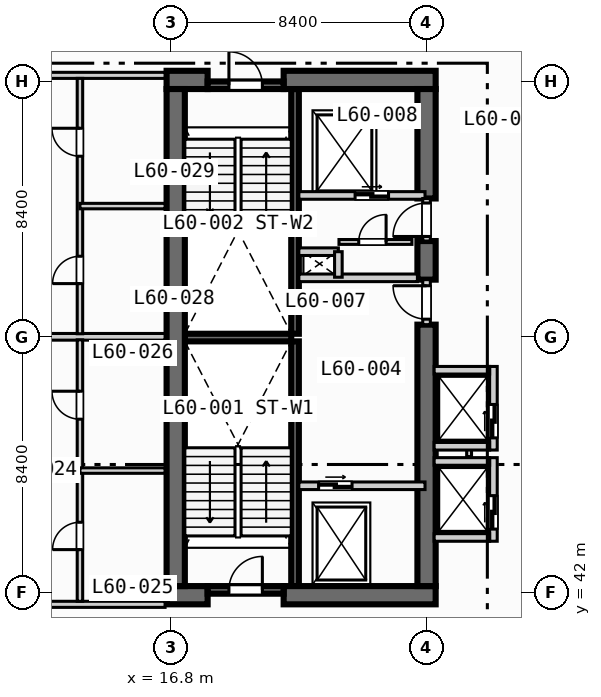
"""IFC4 building model, lengths in metres.
Left out: names, types, materials, properties, quantities, classifications, styles, units other than length and angle.
Written with IfcOpenShell. Run it as: python <this file> out.ifc"""

import sys

from ifc_helpers import new_model, si_unit, direction, frame, frame_2d, origin, place, context, subcontext, project, spatial, rectangle, extrude, element, fill, save


model = new_model("IFC4")
c1 = context("Model", 3, precision=1e-05, world=origin(), true_north=direction((0.0, 1.0)))
c2 = subcontext(c1, "Body", "Model", "MODEL_VIEW")
j1 = project(units=[si_unit("LENGTHUNIT", "METRE"), si_unit("PLANEANGLEUNIT", "RADIAN")], contexts=[c1])
p1 = place(None, origin())
s1 = spatial("IfcSite", under=j1, at=p1, CompositionType="ELEMENT")
p2 = place(p1, origin())
s2 = spatial("IfcBuilding", under=s1, at=p2, CompositionType="ELEMENT")
p3 = place(p2, frame((0.0, 0.0, 245.3)))
s3 = spatial("IfcBuildingStorey", under=s2, at=p3, CompositionType="ELEMENT", Elevation=245.3)
for number, where, z_axis, x_axis in (
    (1, (20.875, 42.2, 0.0), (0.0, 0.0, 1.0), (0.0, 1.0, 0.0)),
    (2, (20.875, 50.5, 0.0), (0.0, 0.0, 1.0), (0.0, 1.0, 0.0)),
):
    element("IfcWall", number, at=place(p3, frame(where, z_axis=z_axis, x_axis=x_axis)), inside=s3, PredefinedType="SOLIDWALL", context=c2, shape_type="SweptSolid", body=[
        extrude(rectangle(XDim=8.05, YDim=0.25, at=frame_2d((4.025, 0.0))), origin(), (0.0, 0.0, 1.0), 3.47),
    ])
p4 = place(p3, frame((17.25, 50.375, 0.0), z_axis=(0.0, 0.0, 1.0), x_axis=(1.0, 0.0, 0.0)))
e3 = element("IfcWall", 3, at=p4, inside=s3, PredefinedType="SOLIDWALL", context=c2, shape_type="SweptSolid", body=[
    extrude(rectangle(XDim=3.5, YDim=0.25, at=frame_2d((1.75, 0.0))), origin(), (0.0, 0.0, 1.0), 3.47),
])
p5 = place(p3, frame((16.65, 41.9, 0.0), z_axis=(0.0, 0.0, 1.0), x_axis=(1.0, 0.0, 0.0)))
e4 = element("IfcWall", 4, at=p5, inside=s3, PredefinedType="SHEAR", context=c2, shape_type="SweptSolid", body=[
    extrude(rectangle(XDim=1.35, YDim=0.6, at=frame_2d((0.675, 0.0))), origin(), (0.0, 0.0, 1.0), 3.47),
])
p6 = place(p3, frame((20.5, 41.9, 0.0), z_axis=(0.0, 0.0, 1.0), x_axis=(1.0, 0.0, 0.0)))
e5 = element("IfcWall", 5, at=p6, inside=s3, PredefinedType="SHEAR", context=c2, shape_type="SweptSolid", body=[
    extrude(rectangle(XDim=5.0, YDim=0.6, at=frame_2d((2.5, 0.0))), origin(), (0.0, 0.0, 1.0), 3.47),
])
p7 = place(p3, frame((16.65, 58.85, 0.0), z_axis=(0.0, 0.0, 1.0), x_axis=(1.0, 0.0, 0.0)))
e6 = element("IfcWall", 6, at=p7, inside=s3, PredefinedType="SHEAR", context=c2, shape_type="SweptSolid", body=[
    extrude(rectangle(XDim=1.35, YDim=0.6, at=frame_2d((0.675, 0.0))), origin(), (0.0, 0.0, 1.0), 3.47),
])
p8 = place(p3, frame((20.5, 58.85, 0.0), z_axis=(0.0, 0.0, 1.0), x_axis=(1.0, 0.0, 0.0)))
e7 = element("IfcWall", 7, at=p8, inside=s3, PredefinedType="SHEAR", context=c2, shape_type="SweptSolid", body=[
    extrude(rectangle(XDim=5.0, YDim=0.6, at=frame_2d((2.5, 0.0))), origin(), (0.0, 0.0, 1.0), 3.47),
])
p9 = place(p3, frame((16.95, 42.2, 0.0), z_axis=(0.0, 0.0, 1.0), x_axis=(0.0, 1.0, 0.0)))
e8 = element("IfcWall", 8, at=p9, inside=s3, PredefinedType="SHEAR", context=c2, shape_type="SweptSolid", body=[
    extrude(rectangle(XDim=16.35, YDim=0.6, at=frame_2d((8.175, 0.0))), origin(), (0.0, 0.0, 1.0), 3.47),
])
p10 = place(p3, frame((25.2, 42.2, 0.0), z_axis=(0.0, 0.0, 1.0), x_axis=(0.0, 1.0, 0.0)))
e9 = element("IfcWall", 9, at=p10, inside=s3, PredefinedType="SHEAR", context=c2, shape_type="SweptSolid", body=[
    extrude(rectangle(XDim=8.6, YDim=0.6, at=frame_2d((4.3, 0.0))), origin(), (0.0, 0.0, 1.0), 3.47),
])
p11 = place(p3, frame((25.2, 52.28, 0.0), z_axis=(0.0, 0.0, 1.0), x_axis=(0.0, 1.0, 0.0)))
e10 = element("IfcWall", 10, at=p11, inside=s3, PredefinedType="SHEAR", context=c2, shape_type="SweptSolid", body=[
    extrude(rectangle(XDim=1.27, YDim=0.6, at=frame_2d((0.635, 0.0))), origin(), (0.0, 0.0, 1.0), 3.47),
])
p12 = place(p3, frame((25.2, 54.95, 0.0), z_axis=(0.0, 0.0, 1.0), x_axis=(0.0, 1.0, 0.0)))
e11 = element("IfcWall", 11, at=p12, inside=s3, PredefinedType="SHEAR", context=c2, shape_type="SweptSolid", body=[
    extrude(rectangle(XDim=3.6, YDim=0.6, at=frame_2d((1.8, 0.0))), origin(), (0.0, 0.0, 1.0), 3.47),
])
p13 = place(p3, frame((18.0, 42.075, 0.0), z_axis=(0.0, 0.0, 1.0), x_axis=(1.0, 0.0, 0.0)))
e12 = element("IfcWall", 12, at=p13, inside=s3, PredefinedType="SOLIDWALL", context=c2, shape_type="SweptSolid", body=[
    extrude(rectangle(XDim=2.5, YDim=0.25, at=frame_2d((1.25, 0.0))), origin(), (0.0, 0.0, 1.0), 3.47),
])
p14 = place(p13, frame((0.7, 0.0, 0.0)))
e13 = element("IfcOpeningElement", 13, at=p14, cuts=e12, PredefinedType="OPENING", context=c2, shape_type="SweptSolid", body=[
    extrude(rectangle(XDim=1.1, YDim=2.15, at=frame_2d((0.55, 1.075))), frame((0.0, 0.135, 0.0), z_axis=(0.0, -1.0, 0.0), x_axis=(1.0, 0.0, 0.0)), (0.0, 0.0, 1.0), 0.27),
])
p15 = place(p3, frame((18.0, 58.675, 0.0), z_axis=(0.0, 0.0, 1.0), x_axis=(1.0, 0.0, 0.0)))
e14 = element("IfcWall", 14, at=p15, inside=s3, PredefinedType="SOLIDWALL", context=c2, shape_type="SweptSolid", body=[
    extrude(rectangle(XDim=2.5, YDim=0.25, at=frame_2d((1.25, 0.0))), origin(), (0.0, 0.0, 1.0), 3.47),
])
p16 = place(p15, frame((0.7, 0.0, 0.0)))
e15 = element("IfcOpeningElement", 15, at=p16, cuts=e14, PredefinedType="OPENING", context=c2, shape_type="SweptSolid", body=[
    extrude(rectangle(XDim=1.1, YDim=2.15, at=frame_2d((0.55, 1.075))), frame((0.0, 0.135, 0.0), z_axis=(0.0, -1.0, 0.0), x_axis=(1.0, 0.0, 0.0)), (0.0, 0.0, 1.0), 0.27),
])
p17 = place(p3, frame((21.0, 45.5, 0.0), z_axis=(0.0, 0.0, 1.0), x_axis=(1.0, 0.0, 0.0)))
e16 = element("IfcWall", 16, at=p17, inside=s3, PredefinedType="SOLIDWALL", context=c2, shape_type="SweptSolid", body=[
    extrude(rectangle(XDim=4.15, YDim=0.25, at=frame_2d((2.075, 0.0))), origin(), (0.0, 0.0, 1.0), 3.47),
])
p18 = place(p17, frame((0.65, 0.0, 0.0)))
e17 = element("IfcOpeningElement", 17, at=p18, cuts=e16, PredefinedType="OPENING", context=c2, shape_type="SweptSolid", body=[
    extrude(rectangle(XDim=1.1, YDim=2.15, at=frame_2d((0.55, 1.075))), frame((0.0, 0.135, 0.0), z_axis=(0.0, -1.0, 0.0), x_axis=(1.0, 0.0, 0.0)), (0.0, 0.0, 1.0), 0.27),
])
p19 = place(p3, frame((25.2, 50.8, 0.0), z_axis=(0.0, 0.0, 1.0), x_axis=(0.0, 1.0, 0.0)))
e18 = element("IfcWall", 18, at=p19, inside=s3, PredefinedType="SOLIDWALL", context=c2, shape_type="SweptSolid", body=[
    extrude(rectangle(XDim=1.48, YDim=0.25, at=frame_2d((0.74, 0.0))), origin(), (0.0, 0.0, 1.0), 3.47),
])
p20 = place(p19, frame((0.18, 0.0, 0.0)))
e19 = element("IfcOpeningElement", 19, at=p20, cuts=e18, PredefinedType="OPENING", context=c2, shape_type="SweptSolid", body=[
    extrude(rectangle(XDim=1.1, YDim=2.15, at=frame_2d((0.55, 1.075))), frame((0.0, 0.135, 0.0), z_axis=(0.0, -1.0, 0.0), x_axis=(1.0, 0.0, 0.0)), (0.0, 0.0, 1.0), 0.27),
])
p21 = place(p3, frame((21.0, 52.34, 0.0), z_axis=(0.0, 0.0, 1.0), x_axis=(1.0, 0.0, 0.0)))
e20 = element("IfcWall", 20, at=p21, inside=s3, PredefinedType="SOLIDWALL", context=c2, shape_type="SweptSolid", body=[
    extrude(rectangle(XDim=3.9, YDim=0.25, at=frame_2d((1.95, 0.0))), origin(), (0.0, 0.0, 1.0), 3.47),
])
p22 = place(p3, frame((21.0, 55.05, 0.0), z_axis=(0.0, 0.0, 1.0), x_axis=(1.0, 0.0, 0.0)))
e21 = element("IfcWall", 21, at=p22, inside=s3, PredefinedType="SOLIDWALL", context=c2, shape_type="SweptSolid", body=[
    extrude(rectangle(XDim=4.15, YDim=0.25, at=frame_2d((2.075, 0.0))), origin(), (0.0, 0.0, 1.0), 3.47),
])
p23 = place(p22, frame((1.85, 0.0, 0.0)))
e22 = element("IfcOpeningElement", 22, at=p23, cuts=e21, PredefinedType="OPENING", context=c2, shape_type="SweptSolid", body=[
    extrude(rectangle(XDim=1.1, YDim=2.15, at=frame_2d((0.55, 1.075))), frame((0.0, 0.135, 0.0), z_axis=(0.0, -1.0, 0.0), x_axis=(1.0, 0.0, 0.0)), (0.0, 0.0, 1.0), 0.27),
])
p24 = place(p3, frame((25.2, 53.55, 0.0), z_axis=(0.0, 0.0, 1.0), x_axis=(0.0, 1.0, 0.0)))
e23 = element("IfcWall", 23, at=p24, inside=s3, PredefinedType="SOLIDWALL", context=c2, shape_type="SweptSolid", body=[
    extrude(rectangle(XDim=1.4, YDim=0.25, at=frame_2d((0.7, 0.0))), origin(), (0.0, 0.0, 1.0), 3.47),
])
p25 = place(p24, frame((0.15, 0.0, 0.0)))
e24 = element("IfcOpeningElement", 24, at=p25, cuts=e23, PredefinedType="OPENING", context=c2, shape_type="SweptSolid", body=[
    extrude(rectangle(XDim=1.1, YDim=2.15, at=frame_2d((0.55, 1.075))), frame((0.0, 0.135, 0.0), z_axis=(0.0, -1.0, 0.0), x_axis=(1.0, 0.0, 0.0)), (0.0, 0.0, 1.0), 0.27),
])
p26 = place(p3, frame((21.0, 53.2, 0.0), z_axis=(0.0, 0.0, 1.0), x_axis=(1.0, 0.0, 0.0)))
e25 = element("IfcWall", 25, at=p26, inside=s3, PredefinedType="SOLIDWALL", context=c2, shape_type="SweptSolid", body=[
    extrude(rectangle(XDim=1.3, YDim=0.25, at=frame_2d((0.65, 0.0))), origin(), (0.0, 0.0, 1.0), 3.47),
])
p27 = place(p3, frame((22.3, 52.36, 0.0), z_axis=(0.0, 0.0, 1.0), x_axis=(0.0, 1.0, 0.0)))
e26 = element("IfcWall", 26, at=p27, inside=s3, PredefinedType="SOLIDWALL", context=c2, shape_type="SweptSolid", body=[
    extrude(rectangle(XDim=0.84, YDim=0.25, at=frame_2d((0.42, 0.0))), origin(), (0.0, 0.0, 1.0), 3.47),
])
p28 = place(p3, frame((22.32, 53.52, 0.0), z_axis=(0.0, 0.0, 1.0), x_axis=(1.0, 0.0, 0.0)))
e27 = element("IfcWall", 27, at=p28, inside=s3, PredefinedType="PARTITIONING", context=c2, shape_type="SweptSolid", body=[
    extrude(rectangle(XDim=2.4, YDim=0.16, at=frame_2d((1.2, 0.0))), origin(), (0.0, 0.0, 1.0), 3.47),
])
p29 = place(p28, frame((0.65, 0.0, 0.0)))
e28 = element("IfcOpeningElement", 28, at=p29, cuts=e27, PredefinedType="OPENING", context=c2, shape_type="SweptSolid", body=[
    extrude(rectangle(XDim=0.9, YDim=2.1, at=frame_2d((0.45, 1.05))), frame((0.0, 0.09, 0.0), z_axis=(0.0, -1.0, 0.0), x_axis=(1.0, 0.0, 0.0)), (0.0, 0.0, 1.0), 0.18),
])
p30 = place(p3, frame((27.4, 43.675, 0.0), z_axis=(0.0, 0.0, 1.0), x_axis=(0.0, 1.0, 0.0)))
e29 = element("IfcWall", 29, at=p30, inside=s3, PredefinedType="SOLIDWALL", context=c2, shape_type="SweptSolid", body=[
    extrude(rectangle(XDim=2.75, YDim=0.25, at=frame_2d((1.375, 0.0))), origin(), (0.0, 0.0, 1.0), 3.47),
])
p31 = place(p30, frame((0.4, 0.0, 0.0)))
e30 = element("IfcOpeningElement", 30, at=p31, cuts=e29, PredefinedType="OPENING", context=c2, shape_type="SweptSolid", body=[
    extrude(rectangle(XDim=1.1, YDim=2.15, at=frame_2d((0.55, 1.075))), frame((0.0, 0.135, 0.0), z_axis=(0.0, -1.0, 0.0), x_axis=(1.0, 0.0, 0.0)), (0.0, 0.0, 1.0), 0.27),
])
for number, where, z_axis, x_axis in (
    (31, (25.45, 43.8, 0.0), (0.0, 0.0, 1.0), (1.0, 0.0, 0.0)),
    (32, (25.45, 46.3, 0.0), (0.0, 0.0, 1.0), (1.0, 0.0, 0.0)),
):
    element("IfcWall", number, at=place(p3, frame(where, z_axis=z_axis, x_axis=x_axis)), inside=s3, PredefinedType="SOLIDWALL", context=c2, shape_type="SweptSolid", body=[
        extrude(rectangle(XDim=1.825, YDim=0.25, at=frame_2d((0.913, 0.0))), origin(), (0.0, 0.0, 1.0), 3.47),
    ])
p32 = place(p3, frame((26.6, 46.46, 0.0), z_axis=(0.0, 0.0, 1.0), x_axis=(0.0, 1.0, 0.0)))
e33 = element("IfcWall", 33, at=p32, inside=s3, PredefinedType="PARTITIONING", context=c2, shape_type="SweptSolid", body=[
    extrude(rectangle(XDim=0.88, YDim=0.16, at=frame_2d((0.44, 0.0))), origin(), (0.0, 0.0, 1.0), 3.47),
])
p33 = place(p3, frame((27.4, 46.675, 0.0), z_axis=(0.0, 0.0, 1.0), x_axis=(0.0, 1.0, 0.0)))
e34 = element("IfcWall", 34, at=p33, inside=s3, PredefinedType="SOLIDWALL", context=c2, shape_type="SweptSolid", body=[
    extrude(rectangle(XDim=2.75, YDim=0.25, at=frame_2d((1.375, 0.0))), origin(), (0.0, 0.0, 1.0), 3.47),
])
p34 = place(p33, frame((0.4, 0.0, 0.0)))
e35 = element("IfcOpeningElement", 35, at=p34, cuts=e34, PredefinedType="OPENING", context=c2, shape_type="SweptSolid", body=[
    extrude(rectangle(XDim=1.1, YDim=2.15, at=frame_2d((0.55, 1.075))), frame((0.0, 0.135, 0.0), z_axis=(0.0, -1.0, 0.0), x_axis=(1.0, 0.0, 0.0)), (0.0, 0.0, 1.0), 0.27),
])
for number, where, z_axis, x_axis in (
    (36, (25.45, 46.8, 0.0), (0.0, 0.0, 1.0), (1.0, 0.0, 0.0)),
    (37, (25.45, 49.3, 0.0), (0.0, 0.0, 1.0), (1.0, 0.0, 0.0)),
):
    element("IfcWall", number, at=place(p3, frame(where, z_axis=z_axis, x_axis=x_axis)), inside=s3, PredefinedType="SOLIDWALL", context=c2, shape_type="SweptSolid", body=[
        extrude(rectangle(XDim=1.825, YDim=0.25, at=frame_2d((0.913, 0.0))), origin(), (0.0, 0.0, 1.0), 3.47),
    ])
p35 = place(p3, frame((8.65, 41.6, 0.0), z_axis=(0.0, 0.0, 1.0), x_axis=(1.0, 0.0, 0.0)))
e38 = element("IfcWall", 38, at=p35, inside=s3, PredefinedType="PARTITIONING", context=c2, shape_type="SweptSolid", body=[
    extrude(rectangle(XDim=7.95, YDim=0.2, at=frame_2d((3.975, 0.0))), origin(), (0.0, 0.0, 1.0), 3.47),
])
p36 = place(p35, frame((2.0, 0.0, 0.0)))
e39 = element("IfcOpeningElement", 39, at=p36, cuts=e38, PredefinedType="OPENING", context=c2, shape_type="SweptSolid", body=[
    extrude(rectangle(XDim=1.0, YDim=2.15, at=frame_2d((0.5, 1.075))), frame((0.0, 0.11, 0.0), z_axis=(0.0, -1.0, 0.0), x_axis=(1.0, 0.0, 0.0)), (0.0, 0.0, 1.0), 0.22),
])
p37 = place(p3, frame((8.65, 59.0, 0.0), z_axis=(0.0, 0.0, 1.0), x_axis=(1.0, 0.0, 0.0)))
e40 = element("IfcWall", 40, at=p37, inside=s3, PredefinedType="PARTITIONING", context=c2, shape_type="SweptSolid", body=[
    extrude(rectangle(XDim=7.95, YDim=0.2, at=frame_2d((3.975, 0.0))), origin(), (0.0, 0.0, 1.0), 2.82),
])
p38 = place(p37, frame((2.0, 0.0, 0.0)))
e41 = element("IfcOpeningElement", 41, at=p38, cuts=e40, PredefinedType="OPENING", context=c2, shape_type="SweptSolid", body=[
    extrude(rectangle(XDim=1.0, YDim=2.15, at=frame_2d((0.5, 1.075))), frame((0.0, 0.11, 0.0), z_axis=(0.0, -1.0, 0.0), x_axis=(1.0, 0.0, 0.0)), (0.0, 0.0, 1.0), 0.22),
])
p39 = place(p3, frame((8.65, 50.4, 0.0), z_axis=(0.0, 0.0, 1.0), x_axis=(1.0, 0.0, 0.0)))
e42 = element("IfcWall", 42, at=p39, inside=s3, PredefinedType="PARTITIONING", context=c2, shape_type="SweptSolid", body=[
    extrude(rectangle(XDim=7.95, YDim=0.22, at=frame_2d((3.975, 0.0))), origin(), (0.0, 0.0, 1.0), 2.859),
])
p40 = place(p3, frame((13.8, 41.7, 0.0), z_axis=(0.0, 0.0, 1.0), x_axis=(0.0, 1.0, 0.0)))
e43 = element("IfcWall", 43, at=p40, inside=s3, PredefinedType="PLUMBINGWALL", context=c2, shape_type="SweptSolid", body=[
    extrude(rectangle(XDim=8.6, YDim=0.18, at=frame_2d((4.3, 0.0))), origin(), (0.0, 0.0, 1.0), 3.47),
])
p41 = place(p40, frame((1.7, 0.0, 0.0)))
e44 = element("IfcOpeningElement", 44, at=p41, cuts=e43, PredefinedType="OPENING", context=c2, shape_type="SweptSolid", body=[
    extrude(rectangle(XDim=0.9, YDim=2.1, at=frame_2d((0.45, 1.05))), frame((0.0, 0.1, 0.0), z_axis=(0.0, -1.0, 0.0), x_axis=(1.0, 0.0, 0.0)), (0.0, 0.0, 1.0), 0.2),
])
p42 = place(p40, frame((5.99, 0.0, 0.0)))
e45 = element("IfcOpeningElement", 45, at=p42, cuts=e43, PredefinedType="OPENING", context=c2, shape_type="SweptSolid", body=[
    extrude(rectangle(XDim=0.92, YDim=2.1, at=frame_2d((0.46, 1.05))), frame((0.0, 0.1, 0.0), z_axis=(0.0, -1.0, 0.0), x_axis=(1.0, 0.0, 0.0)), (0.0, 0.0, 1.0), 0.2),
])
p43 = place(p3, frame((13.8, 46.0, 0.0), z_axis=(0.0, 0.0, 1.0), x_axis=(1.0, 0.0, 0.0)))
e46 = element("IfcWall", 46, at=p43, inside=s3, PredefinedType="PLUMBINGWALL", context=c2, shape_type="SweptSolid", body=[
    extrude(rectangle(XDim=2.8, YDim=0.18, at=frame_2d((1.4, 0.0))), origin(), (0.0, 0.0, 1.0), 3.47),
])
p44 = place(p3, frame((13.8, 50.5, 0.0), z_axis=(0.0, 0.0, 1.0), x_axis=(0.0, 1.0, 0.0)))
e47 = element("IfcWall", 47, at=p44, inside=s3, PredefinedType="PLUMBINGWALL", context=c2, shape_type="SweptSolid", body=[
    extrude(rectangle(XDim=8.4, YDim=0.18, at=frame_2d((4.2, 0.0))), origin(), (0.0, 0.0, 1.0), 3.47),
])
p45 = place(p44, frame((1.65, 0.0, 0.0)))
e48 = element("IfcOpeningElement", 48, at=p45, cuts=e47, PredefinedType="OPENING", context=c2, shape_type="SweptSolid", body=[
    extrude(rectangle(XDim=0.9, YDim=2.1, at=frame_2d((0.45, 1.05))), frame((0.0, 0.1, 0.0), z_axis=(0.0, -1.0, 0.0), x_axis=(1.0, 0.0, 0.0)), (0.0, 0.0, 1.0), 0.2),
])
p46 = place(p44, frame((5.84, 0.0, 0.0)))
e49 = element("IfcOpeningElement", 49, at=p46, cuts=e47, PredefinedType="OPENING", context=c2, shape_type="SweptSolid", body=[
    extrude(rectangle(XDim=0.92, YDim=2.1, at=frame_2d((0.46, 1.05))), frame((0.0, 0.1, 0.0), z_axis=(0.0, -1.0, 0.0), x_axis=(1.0, 0.0, 0.0)), (0.0, 0.0, 1.0), 0.2),
])
p47 = place(p3, frame((13.8, 54.7, 0.0), z_axis=(0.0, 0.0, 1.0), x_axis=(1.0, 0.0, 0.0)))
e50 = element("IfcWall", 50, at=p47, inside=s3, PredefinedType="PLUMBINGWALL", context=c2, shape_type="SweptSolid", body=[
    extrude(rectangle(XDim=2.8, YDim=0.18, at=frame_2d((1.4, 0.0))), origin(), (0.0, 0.0, 1.0), 3.47),
])
p48 = place(p14, origin())
e51 = element("IfcDoor", 51, at=p48, inside=s3, OperationType="SINGLE_SWING_RIGHT", PredefinedType="DOOR", context=c2, shape_type="SweptSolid", body=[
    extrude(rectangle(XDim=1.1, YDim=2.15, at=frame_2d((0.55, 1.075))), frame((0.0, 0.025, 0.0), z_axis=(0.0, -1.0, 0.0), x_axis=(1.0, 0.0, 0.0)), (0.0, 0.0, 1.0), 0.05),
])
fill(e13, e51)
p49 = place(p16, origin())
e52 = element("IfcDoor", 52, at=p49, inside=s3, OperationType="SINGLE_SWING_LEFT", PredefinedType="DOOR", context=c2, shape_type="SweptSolid", body=[
    extrude(rectangle(XDim=1.1, YDim=2.15, at=frame_2d((0.55, 1.075))), frame((0.0, 0.025, 0.0), z_axis=(0.0, -1.0, 0.0), x_axis=(1.0, 0.0, 0.0)), (0.0, 0.0, 1.0), 0.05),
])
fill(e15, e52)
p50 = place(p18, origin())
e53 = element("IfcDoor", 53, at=p50, inside=s3, OperationType="SLIDING_TO_LEFT", PredefinedType="DOOR", context=c2, shape_type="SweptSolid", body=[
    extrude(rectangle(XDim=1.1, YDim=2.15, at=frame_2d((0.55, 1.075))), frame((0.0, 0.025, 0.0), z_axis=(0.0, -1.0, 0.0), x_axis=(1.0, 0.0, 0.0)), (0.0, 0.0, 1.0), 0.05),
])
fill(e17, e53)
p51 = place(p20, origin())
e54 = element("IfcDoor", 54, at=p51, inside=s3, OperationType="SINGLE_SWING_RIGHT", PredefinedType="DOOR", context=c2, shape_type="SweptSolid", body=[
    extrude(rectangle(XDim=1.1, YDim=2.15, at=frame_2d((0.55, 1.075))), frame((0.0, 0.025, 0.0), z_axis=(0.0, -1.0, 0.0), x_axis=(1.0, 0.0, 0.0)), (0.0, 0.0, 1.0), 0.05),
])
fill(e19, e54)
p52 = place(p23, origin())
e55 = element("IfcDoor", 55, at=p52, inside=s3, OperationType="SLIDING_TO_LEFT", PredefinedType="DOOR", context=c2, shape_type="SweptSolid", body=[
    extrude(rectangle(XDim=1.1, YDim=2.15, at=frame_2d((0.55, 1.075))), frame((0.0, 0.025, 0.0), z_axis=(0.0, -1.0, 0.0), x_axis=(1.0, 0.0, 0.0)), (0.0, 0.0, 1.0), 0.05),
])
fill(e22, e55)
p53 = place(p25, origin())
e56 = element("IfcDoor", 56, at=p53, inside=s3, OperationType="SINGLE_SWING_LEFT", PredefinedType="DOOR", context=c2, shape_type="SweptSolid", body=[
    extrude(rectangle(XDim=1.1, YDim=2.15, at=frame_2d((0.55, 1.075))), frame((0.0, 0.025, 0.0), z_axis=(0.0, -1.0, 0.0), x_axis=(1.0, 0.0, 0.0)), (0.0, 0.0, 1.0), 0.05),
])
fill(e24, e56)
p54 = place(p29, origin())
e57 = element("IfcDoor", 57, at=p54, inside=s3, OperationType="SINGLE_SWING_RIGHT", PredefinedType="DOOR", context=c2, shape_type="SweptSolid", body=[
    extrude(rectangle(XDim=0.9, YDim=2.1, at=frame_2d((0.45, 1.05))), frame((0.0, 0.025, 0.0), z_axis=(0.0, -1.0, 0.0), x_axis=(1.0, 0.0, 0.0)), (0.0, 0.0, 1.0), 0.05),
])
fill(e28, e57)
p55 = place(p31, origin())
e58 = element("IfcDoor", 58, at=p55, inside=s3, OperationType="SLIDING_TO_LEFT", PredefinedType="DOOR", context=c2, shape_type="SweptSolid", body=[
    extrude(rectangle(XDim=1.1, YDim=2.15, at=frame_2d((0.55, 1.075))), frame((0.0, 0.025, 0.0), z_axis=(0.0, -1.0, 0.0), x_axis=(1.0, 0.0, 0.0)), (0.0, 0.0, 1.0), 0.05),
])
fill(e30, e58)
p56 = place(p34, origin())
e59 = element("IfcDoor", 59, at=p56, inside=s3, OperationType="SLIDING_TO_LEFT", PredefinedType="DOOR", context=c2, shape_type="SweptSolid", body=[
    extrude(rectangle(XDim=1.1, YDim=2.15, at=frame_2d((0.55, 1.075))), frame((0.0, 0.025, 0.0), z_axis=(0.0, -1.0, 0.0), x_axis=(1.0, 0.0, 0.0)), (0.0, 0.0, 1.0), 0.05),
])
fill(e35, e59)
p57 = place(p41, origin())
e60 = element("IfcDoor", 60, at=p57, inside=s3, OperationType="SINGLE_SWING_LEFT", PredefinedType="DOOR", context=c2, shape_type="SweptSolid", body=[
    extrude(rectangle(XDim=0.9, YDim=2.1, at=frame_2d((0.45, 1.05))), frame((0.0, 0.025, 0.0), z_axis=(0.0, -1.0, 0.0), x_axis=(1.0, 0.0, 0.0)), (0.0, 0.0, 1.0), 0.05),
])
fill(e44, e60)
p58 = place(p42, origin())
e61 = element("IfcDoor", 61, at=p58, inside=s3, OperationType="SINGLE_SWING_RIGHT", PredefinedType="DOOR", context=c2, shape_type="SweptSolid", body=[
    extrude(rectangle(XDim=0.92, YDim=2.1, at=frame_2d((0.46, 1.05))), frame((0.0, 0.025, 0.0), z_axis=(0.0, -1.0, 0.0), x_axis=(1.0, 0.0, 0.0)), (0.0, 0.0, 1.0), 0.05),
])
fill(e45, e61)
p59 = place(p45, origin())
e62 = element("IfcDoor", 62, at=p59, inside=s3, OperationType="SINGLE_SWING_LEFT", PredefinedType="DOOR", context=c2, shape_type="SweptSolid", body=[
    extrude(rectangle(XDim=0.9, YDim=2.1, at=frame_2d((0.45, 1.05))), frame((0.0, 0.025, 0.0), z_axis=(0.0, -1.0, 0.0), x_axis=(1.0, 0.0, 0.0)), (0.0, 0.0, 1.0), 0.05),
])
fill(e48, e62)
p60 = place(p46, origin())
e63 = element("IfcDoor", 63, at=p60, inside=s3, OperationType="SINGLE_SWING_RIGHT", PredefinedType="DOOR", context=c2, shape_type="SweptSolid", body=[
    extrude(rectangle(XDim=0.92, YDim=2.1, at=frame_2d((0.46, 1.05))), frame((0.0, 0.025, 0.0), z_axis=(0.0, -1.0, 0.0), x_axis=(1.0, 0.0, 0.0)), (0.0, 0.0, 1.0), 0.05),
])
fill(e49, e63)
save(model, sys.argv[1])
